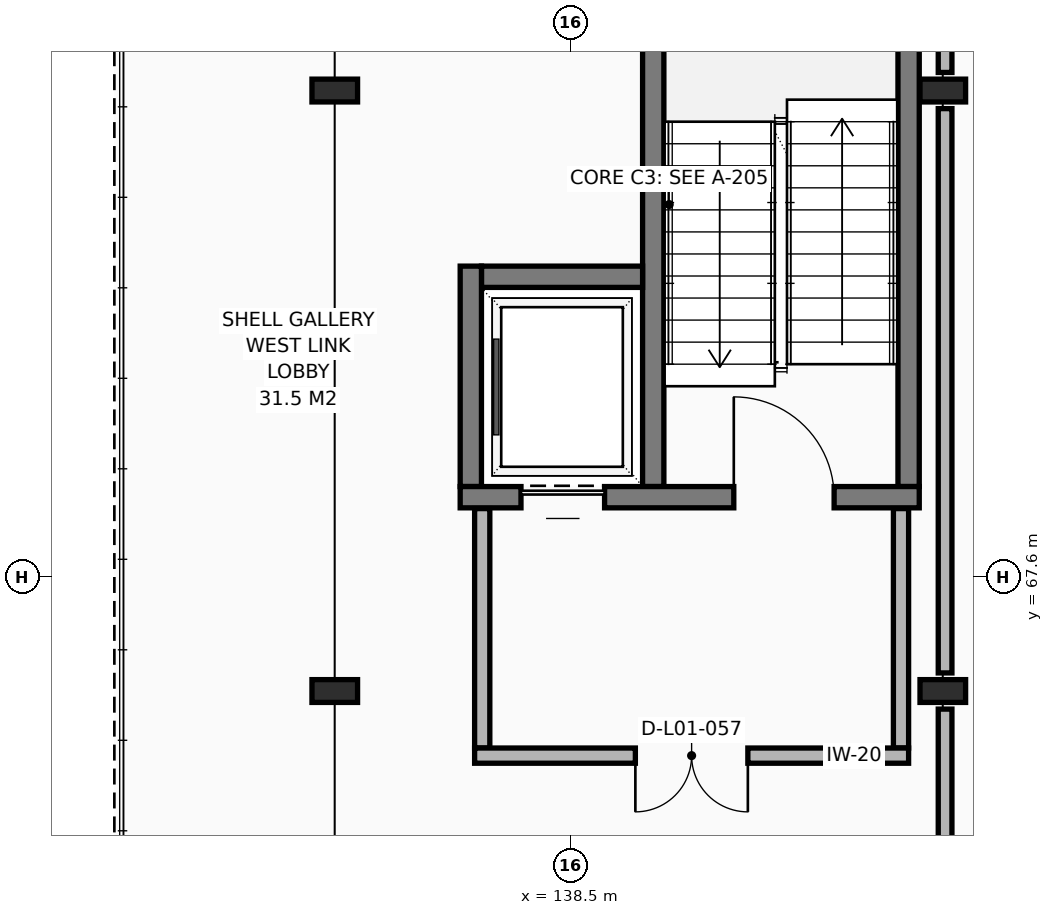
"""IFC4 building model, lengths in metres.
Left out: names, types, materials, properties, quantities, classifications, styles, units other than length and angle.
Written with IfcOpenShell. Run it as: python <this file> out.ifc"""

import sys

from ifc_helpers import new_model, si_unit, direction, frame, frame_2d, origin, origin_2d, place, context, subcontext, project, spatial, rectangle, i_section, extrude, element, fill, save


model = new_model("IFC4")
c1 = context("Model", 3, precision=1e-05, world=origin(), true_north=direction((0.0, 1.0)))
c2 = subcontext(c1, "Body", "Model", "MODEL_VIEW")
j1 = project(units=[si_unit("LENGTHUNIT", "METRE"), si_unit("PLANEANGLEUNIT", "RADIAN")], contexts=[c1])
p1 = place(None, origin())
s1 = spatial("IfcSite", under=j1, at=p1, CompositionType="ELEMENT")
p2 = place(p1, origin())
s2 = spatial("IfcBuilding", under=s1, at=p2, CompositionType="ELEMENT")
p3 = place(p2, frame((0.0, 0.0, 5.1)))
s3 = spatial("IfcBuildingStorey", under=s2, at=p3, CompositionType="ELEMENT", Elevation=5.1)
for number, where, z_axis, x_axis in (
    (1, (135.4, 66.1, 0.0), (0.0, 0.0, 1.0), (1.0, 0.0, 0.0)),
    (2, (135.4, 74.0, 0.0), (0.0, 0.0, 1.0), (1.0, 0.0, 0.0)),
    (3, (143.4, 66.1, 0.0), (0.0, 0.0, 1.0), (1.0, 0.0, 0.0)),
    (4, (143.4, 74.0, 0.0), (0.0, 0.0, 1.0), (1.0, 0.0, 0.0)),
):
    element("IfcColumn", number, at=place(p3, frame(where, z_axis=z_axis, x_axis=x_axis)), inside=s3, PredefinedType="COLUMN", context=c2, shape_type="SweptSolid", body=[
        extrude(i_section(OverallWidth=0.3, OverallDepth=0.6, WebThickness=0.015, FlangeThickness=0.03, FilletRadius=0.027, at=origin_2d()), origin(), (0.0, 0.0, 1.0), 4.42),
    ])
for number, where, z_axis, x_axis in (
    (5, (142.95, 68.79, 0.0), (0.0, 0.0, 1.0), (0.0, 1.0, 0.0)),
    (6, (139.59, 76.49, 0.0), (0.0, 0.0, 1.0), (0.0, -1.0, 0.0)),
):
    element("IfcWall", number, at=place(p3, frame(where, z_axis=z_axis, x_axis=x_axis)), inside=s3, PredefinedType="SHEAR", context=c2, shape_type="SweptSolid", body=[
        extrude(rectangle(XDim=7.7, YDim=0.28, at=frame_2d((3.85, 0.0))), origin(), (0.0, 0.0, 1.0), 4.17),
    ])
p4 = place(p3, frame((139.45, 71.55, 0.0), z_axis=(0.0, 0.0, 1.0), x_axis=(-1.0, 0.0, 0.0)))
e7 = element("IfcWall", 7, at=p4, inside=s3, PredefinedType="SHEAR", context=c2, shape_type="SweptSolid", body=[
    extrude(rectangle(XDim=2.12, YDim=0.28, at=frame_2d((1.06, 0.0))), origin(), (0.0, 0.0, 1.0), 4.17),
])
p5 = place(p3, frame((137.19, 71.69, 0.0), z_axis=(0.0, 0.0, 1.0), x_axis=(0.0, -1.0, 0.0)))
e8 = element("IfcWall", 8, at=p5, inside=s3, PredefinedType="SHEAR", context=c2, shape_type="SweptSolid", body=[
    extrude(rectangle(XDim=2.9, YDim=0.28, at=frame_2d((1.45, 0.0))), origin(), (0.0, 0.0, 1.0), 4.17),
])
p6 = place(p3, frame((137.05, 68.65, 0.0), z_axis=(0.0, 0.0, 1.0), x_axis=(1.0, 0.0, 0.0)))
e9 = element("IfcWall", 9, at=p6, inside=s3, PredefinedType="SHEAR", context=c2, shape_type="SweptSolid", body=[
    extrude(rectangle(XDim=6.04, YDim=0.28, at=frame_2d((3.02, 0.0))), origin(), (0.0, 0.0, 1.0), 4.17),
])
p7 = place(p6, frame((0.8, 0.0, 0.0)))
e10 = element("IfcOpeningElement", 10, at=p7, cuts=e9, PredefinedType="OPENING", context=c2, shape_type="SweptSolid", body=[
    extrude(rectangle(XDim=1.1, YDim=2.12, at=frame_2d((0.55, 1.06))), frame((0.0, 0.15, 0.0), z_axis=(0.0, -1.0, 0.0), x_axis=(1.0, 0.0, 0.0)), (0.0, 0.0, 1.0), 0.3),
])
p8 = place(p6, frame((3.6, 0.0, 0.0)))
e11 = element("IfcOpeningElement", 11, at=p8, cuts=e9, PredefinedType="OPENING", context=c2, shape_type="SweptSolid", body=[
    extrude(rectangle(XDim=1.32, YDim=2.12, at=frame_2d((0.66, 1.06))), frame((0.0, 0.15, 0.0), z_axis=(0.0, -1.0, 0.0), x_axis=(1.0, 0.0, 0.0)), (0.0, 0.0, 1.0), 0.3),
])
for number, where, z_axis, x_axis in (
    (12, (142.85, 65.35, 0.0), (0.0, 0.0, 1.0), (0.0, 1.0, 0.0)),
    (13, (137.34, 68.5, 0.0), (0.0, 0.0, 1.0), (0.0, -1.0, 0.0)),
):
    element("IfcWall", number, at=place(p3, frame(where, z_axis=z_axis, x_axis=x_axis)), inside=s3, PredefinedType="PARTITIONING", context=c2, shape_type="SweptSolid", body=[
        extrude(rectangle(XDim=3.15, YDim=0.2, at=frame_2d((1.575, 0.0))), origin(), (0.0, 0.0, 1.0), 3.56),
    ])
p9 = place(p3, frame((142.95, 65.25, 0.0), z_axis=(0.0, 0.0, 1.0), x_axis=(-1.0, 0.0, 0.0)))
e14 = element("IfcWall", 14, at=p9, inside=s3, PredefinedType="PARTITIONING", context=c2, shape_type="SweptSolid", body=[
    extrude(rectangle(XDim=5.71, YDim=0.2, at=frame_2d((2.855, 0.0))), origin(), (0.0, 0.0, 1.0), 4.17),
])
p10 = place(p9, frame((2.115, 0.0, 0.0)))
e15 = element("IfcOpeningElement", 15, at=p10, cuts=e14, PredefinedType="OPENING", context=c2, shape_type="SweptSolid", body=[
    extrude(rectangle(XDim=1.48, YDim=2.15, at=frame_2d((0.74, 1.075))), frame((0.0, 0.11, 0.0), z_axis=(0.0, -1.0, 0.0), x_axis=(1.0, 0.0, 0.0)), (0.0, 0.0, 1.0), 0.22),
])
p11 = place(p3, frame((143.43, 81.662, 0.0), z_axis=(0.0, 0.0, 1.0), x_axis=(0.0, -1.0, 0.0)))
e16 = element("IfcWall", 16, at=p11, inside=s3, PredefinedType="PARTITIONING", context=c2, shape_type="SweptSolid", body=[
    extrude(rectangle(XDim=7.424, YDim=0.18, at=frame_2d((3.712, 0.0))), origin(), (0.0, 0.0, 1.0), 3.15),
])
p12 = place(p11, frame((3.002, 0.0, 0.0)))
e17 = element("IfcOpeningElement", 17, at=p12, cuts=e16, PredefinedType="OPENING", context=c2, shape_type="SweptSolid", body=[
    extrude(rectangle(XDim=1.42, YDim=2.18, at=frame_2d((0.71, 1.09))), frame((0.0, 0.1, 0.0), z_axis=(0.0, -1.0, 0.0), x_axis=(1.0, 0.0, 0.0)), (0.0, 0.0, 1.0), 0.2),
])
p13 = place(p3, frame((143.43, 73.762, 0.0), z_axis=(0.0, 0.0, 1.0), x_axis=(0.0, -1.0, 0.0)))
e18 = element("IfcWall", 18, at=p13, inside=s3, PredefinedType="PARTITIONING", context=c2, shape_type="SweptSolid", body=[
    extrude(rectangle(XDim=7.424, YDim=0.18, at=frame_2d((3.712, 0.0))), origin(), (0.0, 0.0, 1.0), 3.15),
])
p14 = place(p3, frame((143.43, 65.862, 0.0), z_axis=(0.0, 0.0, 1.0), x_axis=(0.0, -1.0, 0.0)))
e19 = element("IfcWall", 19, at=p14, inside=s3, PredefinedType="PARTITIONING", context=c2, shape_type="SweptSolid", body=[
    extrude(rectangle(XDim=7.278, YDim=0.18, at=frame_2d((3.639, 0.0))), origin(), (0.0, 0.0, 1.0), 3.15),
])
p15 = place(p7, origin())
e20 = element("IfcDoor", 20, at=p15, inside=s3, OperationType="SLIDING_TO_LEFT", PredefinedType="DOOR", context=c2, shape_type="SweptSolid", body=[
    extrude(rectangle(XDim=1.1, YDim=2.12, at=frame_2d((0.55, 1.06))), frame((0.0, 0.025, 0.0), z_axis=(0.0, -1.0, 0.0), x_axis=(1.0, 0.0, 0.0)), (0.0, 0.0, 1.0), 0.05),
])
fill(e10, e20)
p16 = place(p8, origin())
e21 = element("IfcDoor", 21, at=p16, inside=s3, OperationType="SINGLE_SWING_LEFT", PredefinedType="DOOR", context=c2, shape_type="SweptSolid", body=[
    extrude(rectangle(XDim=1.32, YDim=2.12, at=frame_2d((0.66, 1.06))), frame((0.0, 0.025, 0.0), z_axis=(0.0, -1.0, 0.0), x_axis=(1.0, 0.0, 0.0)), (0.0, 0.0, 1.0), 0.05),
])
fill(e11, e21)
p17 = place(p10, origin())
e22 = element("IfcDoor", 22, at=p17, inside=s3, OperationType="DOUBLE_DOOR_SINGLE_SWING", PredefinedType="DOOR", context=c2, shape_type="SweptSolid", body=[
    extrude(rectangle(XDim=1.48, YDim=2.15, at=frame_2d((0.74, 1.075))), frame((0.0, 0.025, 0.0), z_axis=(0.0, -1.0, 0.0), x_axis=(1.0, 0.0, 0.0)), (0.0, 0.0, 1.0), 0.05),
])
fill(e15, e22)
save(model, sys.argv[1])
